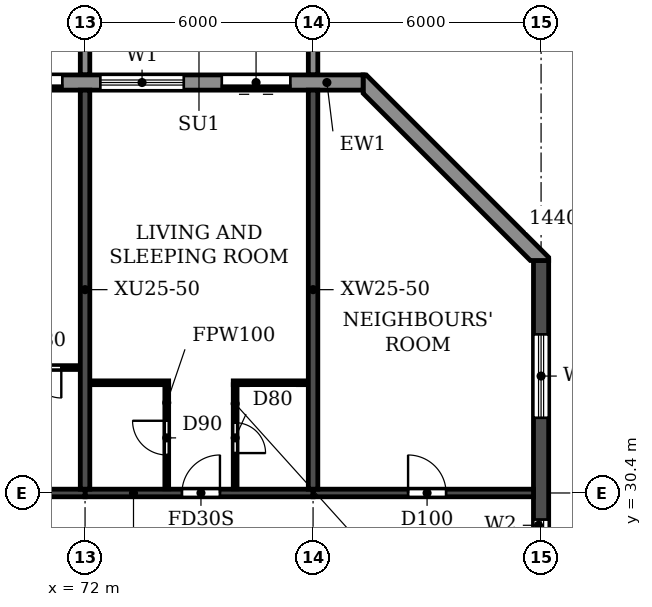
"""IFC4 building model, lengths in metres.
Left out: names, types, materials, properties, quantities, classifications, styles, units other than length and angle.
Written with IfcOpenShell. Run it as: python <this file> out.ifc"""

import sys

from ifc_helpers import new_model, si_unit, direction, frame, frame_2d, origin, place, context, subcontext, project, spatial, polyline, rectangle, outline, extrude, source, transform, mapped, element, fill, save


model = new_model("IFC4")
c1 = context("Model", 3, precision=1e-05, world=origin(), true_north=direction((0.0, 1.0)))
c2 = subcontext(c1, "Body", "Model", "MODEL_VIEW")
j1 = project(units=[si_unit("LENGTHUNIT", "METRE"), si_unit("PLANEANGLEUNIT", "RADIAN")], contexts=[c1])
p1 = place(None, origin())
s1 = spatial("IfcSite", under=j1, at=p1, CompositionType="ELEMENT")
p2 = place(p1, origin())
s2 = spatial("IfcBuilding", under=s1, at=p2, CompositionType="ELEMENT")
p3 = place(p2, frame((0.0, 0.0, 257.7)))
s3 = spatial("IfcBuildingStorey", under=s2, at=p3, CompositionType="ELEMENT", Elevation=257.7)
p4 = place(p3, frame((72.0, 30.5, 0.0), z_axis=(0.0, 0.0, 1.0), x_axis=(0.0, 1.0, 0.0)))
e1 = element("IfcWall", 1, at=p4, inside=s3, PredefinedType="SHEAR", context=c2, shape_type="SweptSolid", body=[
    extrude(rectangle(XDim=10.5, YDim=0.25, at=frame_2d((5.25, 0.0))), origin(), (0.0, 0.0, 1.0), 2.1),
])
p5 = place(p3, frame((78.0, 30.5, 0.0), z_axis=(0.0, 0.0, 1.0), x_axis=(0.0, 1.0, 0.0)))
e2 = element("IfcWall", 2, at=p5, inside=s3, PredefinedType="SHEAR", context=c2, shape_type="SweptSolid", body=[
    extrude(rectangle(XDim=10.5, YDim=0.25, at=frame_2d((5.25, 0.0))), origin(), (0.0, 0.0, 1.0), 3.0),
])
p6 = place(p3, frame((84.0, 4.683, 0.0), z_axis=(0.0, 0.0, 1.0), x_axis=(0.0, 1.0, 0.0)))
e3 = element("IfcWall", 3, at=p6, inside=s3, PredefinedType="SHEAR", context=c2, shape_type="SweptSolid", body=[
    extrude(rectangle(XDim=31.834, YDim=0.4, at=frame_2d((15.917, 0.0))), origin(), (0.0, 0.0, 1.0), 3.0),
])
p7 = place(p6, frame((23.817, 0.0, 0.9)))
e4 = element("IfcOpeningElement", 4, at=p7, cuts=e3, PredefinedType="OPENING", context=c2, shape_type="SweptSolid", body=[
    extrude(rectangle(XDim=1.2, YDim=1.5, at=frame_2d((0.6, 0.75))), frame((0.0, 0.21, 0.0), z_axis=(0.0, -1.0, 0.0), x_axis=(1.0, 0.0, 0.0)), (0.0, 0.0, 1.0), 0.42),
])
p8 = place(p6, frame((8.017, 0.0, 0.9)))
e5 = element("IfcOpeningElement", 5, at=p8, cuts=e3, PredefinedType="OPENING", context=c2, shape_type="SweptSolid", body=[
    extrude(rectangle(XDim=1.2, YDim=1.5, at=frame_2d((0.6, 0.75))), frame((0.0, 0.21, 0.0), z_axis=(0.0, -1.0, 0.0), x_axis=(1.0, 0.0, 0.0)), (0.0, 0.0, 1.0), 0.42),
])
p9 = place(p6, frame((27.694, 0.0, 0.6)))
e6 = element("IfcOpeningElement", 6, at=p9, cuts=e3, PredefinedType="OPENING", context=c2, shape_type="SweptSolid", body=[
    extrude(rectangle(XDim=2.2, YDim=1.8, at=frame_2d((1.1, 0.9))), frame((0.0, 0.21, 0.0), z_axis=(0.0, -1.0, 0.0), x_axis=(1.0, 0.0, 0.0)), (0.0, 0.0, 1.0), 0.42),
])
p10 = place(p6, frame((2.541, 0.0, 0.6)))
e7 = element("IfcOpeningElement", 7, at=p10, cuts=e3, PredefinedType="OPENING", context=c2, shape_type="SweptSolid", body=[
    extrude(rectangle(XDim=2.2, YDim=1.8, at=frame_2d((1.1, 0.9))), frame((0.0, 0.21, 0.0), z_axis=(0.0, -1.0, 0.0), x_axis=(1.0, 0.0, 0.0)), (0.0, 0.0, 1.0), 0.42),
])
p11 = place(p6, frame((15.917, 0.0, 0.9)))
e8 = element("IfcOpeningElement", 8, at=p11, cuts=e3, PredefinedType="OPENING", context=c2, shape_type="SweptSolid", body=[
    extrude(rectangle(XDim=1.2, YDim=1.5, at=frame_2d((0.6, 0.75))), frame((0.0, 0.21, 0.0), z_axis=(0.0, -1.0, 0.0), x_axis=(1.0, 0.0, 0.0)), (0.0, 0.0, 1.0), 0.42),
])
p12 = place(p3, frame((66.0, 30.4, 0.0), z_axis=(0.0, 0.0, 1.0), x_axis=(1.0, 0.0, 0.0)))
e9 = element("IfcWall", 9, at=p12, inside=s3, PredefinedType="SHEAR", context=c2, shape_type="SweptSolid", body=[
    extrude(rectangle(XDim=6.0, YDim=0.2, at=frame_2d((3.0, 0.0))), origin(), (0.0, 0.0, 1.0), 2.4),
])
p13 = place(p12, frame((2.55, 0.0, 0.0)))
e10 = element("IfcOpeningElement", 10, at=p13, cuts=e9, PredefinedType="OPENING", context=c2, shape_type="SweptSolid", body=[
    extrude(rectangle(XDim=1.0, YDim=2.1, at=frame_2d((0.5, 1.05))), frame((0.0, 0.11, 0.0), z_axis=(0.0, -1.0, 0.0), x_axis=(1.0, 0.0, 0.0)), (0.0, 0.0, 1.0), 0.22),
])
p14 = place(p3, frame((72.0, 30.4, 0.0), z_axis=(0.0, 0.0, 1.0), x_axis=(1.0, 0.0, 0.0)))
e11 = element("IfcWall", 11, at=p14, inside=s3, PredefinedType="SHEAR", context=c2, shape_type="SweptSolid", body=[
    extrude(rectangle(XDim=6.0, YDim=0.2, at=frame_2d((3.0, 0.0))), origin(), (0.0, 0.0, 1.0), 2.4),
])
p15 = place(p14, frame((2.55, 0.0, 0.0)))
e12 = element("IfcOpeningElement", 12, at=p15, cuts=e11, PredefinedType="OPENING", context=c2, shape_type="SweptSolid", body=[
    extrude(rectangle(XDim=1.0, YDim=2.1, at=frame_2d((0.5, 1.05))), frame((0.0, 0.11, 0.0), z_axis=(0.0, -1.0, 0.0), x_axis=(1.0, 0.0, 0.0)), (0.0, 0.0, 1.0), 0.22),
])
p16 = place(p3, frame((78.0, 30.4, 0.0), z_axis=(0.0, 0.0, 1.0), x_axis=(1.0, 0.0, 0.0)))
e13 = element("IfcWall", 13, at=p16, inside=s3, PredefinedType="SHEAR", context=c2, shape_type="SweptSolid", body=[
    extrude(rectangle(XDim=5.8, YDim=0.2, at=frame_2d((2.9, 0.0))), origin(), (0.0, 0.0, 1.0), 2.4),
])
p17 = place(p16, frame((2.5, 0.0, 0.0)))
e14 = element("IfcOpeningElement", 14, at=p17, cuts=e13, PredefinedType="OPENING", context=c2, shape_type="SweptSolid", body=[
    extrude(rectangle(XDim=1.0, YDim=2.1, at=frame_2d((0.5, 1.05))), frame((0.0, 0.11, 0.0), z_axis=(0.0, -1.0, 0.0), x_axis=(1.0, 0.0, 0.0)), (0.0, 0.0, 1.0), 0.22),
])
p18 = place(p3, origin())
e15 = element("IfcWall", 15, at=p18, inside=s3, PredefinedType="STANDARD", context=c2, shape_type="SweptSolid", body=[
    extrude(outline(polyline([(84.2, 36.517), (84.2, 36.6), (79.4, 41.4), (79.317, 41.4), (79.317, 40.917), (83.717, 36.517), (84.2, 36.517)])), origin(), (0.0, 0.0, 1.0), 3.0),
])
p19 = place(p3, frame((79.317, 41.2, 0.0), z_axis=(0.0, 0.0, 1.0), x_axis=(-1.0, 0.0, 0.0)))
e16 = element("IfcWall", 16, at=p19, inside=s3, PredefinedType="STANDARD", context=c2, shape_type="SweptSolid", body=[
    extrude(rectangle(XDim=56.634, YDim=0.4, at=frame_2d((28.317, 0.0))), origin(), (0.0, 0.0, 1.0), 3.0),
])
p20 = place(p19, frame((52.717, 0.0, 0.9)))
e17 = element("IfcOpeningElement", 17, at=p20, cuts=e16, PredefinedType="OPENING", context=c2, shape_type="SweptSolid", body=[
    extrude(rectangle(XDim=2.2, YDim=1.5, at=frame_2d((1.1, 0.75))), frame((0.0, 0.21, 0.0), z_axis=(0.0, -1.0, 0.0), x_axis=(1.0, 0.0, 0.0)), (0.0, 0.0, 1.0), 0.42),
])
p21 = place(p19, frame((49.717, 0.0, 0.9)))
e18 = element("IfcOpeningElement", 18, at=p21, cuts=e16, PredefinedType="OPENING", context=c2, shape_type="SweptSolid", body=[
    extrude(rectangle(XDim=2.2, YDim=1.5, at=frame_2d((1.1, 0.75))), frame((0.0, 0.21, 0.0), z_axis=(0.0, -1.0, 0.0), x_axis=(1.0, 0.0, 0.0)), (0.0, 0.0, 1.0), 0.42),
])
p22 = place(p19, frame((46.717, 0.0, 0.9)))
e19 = element("IfcOpeningElement", 19, at=p22, cuts=e16, PredefinedType="OPENING", context=c2, shape_type="SweptSolid", body=[
    extrude(rectangle(XDim=2.2, YDim=1.5, at=frame_2d((1.1, 0.75))), frame((0.0, 0.21, 0.0), z_axis=(0.0, -1.0, 0.0), x_axis=(1.0, 0.0, 0.0)), (0.0, 0.0, 1.0), 0.42),
])
p23 = place(p19, frame((43.917, 0.0, 0.0)))
e20 = element("IfcOpeningElement", 20, at=p23, cuts=e16, PredefinedType="OPENING", context=c2, shape_type="SweptSolid", body=[
    extrude(rectangle(XDim=1.8, YDim=2.4, at=frame_2d((0.9, 1.2))), frame((0.0, 0.21, 0.0), z_axis=(0.0, -1.0, 0.0), x_axis=(1.0, 0.0, 0.0)), (0.0, 0.0, 1.0), 0.42),
])
p24 = place(p19, frame((40.717, 0.0, 0.9)))
e21 = element("IfcOpeningElement", 21, at=p24, cuts=e16, PredefinedType="OPENING", context=c2, shape_type="SweptSolid", body=[
    extrude(rectangle(XDim=2.2, YDim=1.5, at=frame_2d((1.1, 0.75))), frame((0.0, 0.21, 0.0), z_axis=(0.0, -1.0, 0.0), x_axis=(1.0, 0.0, 0.0)), (0.0, 0.0, 1.0), 0.42),
])
p25 = place(p19, frame((37.917, 0.0, 0.0)))
e22 = element("IfcOpeningElement", 22, at=p25, cuts=e16, PredefinedType="OPENING", context=c2, shape_type="SweptSolid", body=[
    extrude(rectangle(XDim=1.8, YDim=2.4, at=frame_2d((0.9, 1.2))), frame((0.0, 0.21, 0.0), z_axis=(0.0, -1.0, 0.0), x_axis=(1.0, 0.0, 0.0)), (0.0, 0.0, 1.0), 0.42),
])
p26 = place(p19, frame((34.717, 0.0, 0.9)))
e23 = element("IfcOpeningElement", 23, at=p26, cuts=e16, PredefinedType="OPENING", context=c2, shape_type="SweptSolid", body=[
    extrude(rectangle(XDim=2.2, YDim=1.5, at=frame_2d((1.1, 0.75))), frame((0.0, 0.21, 0.0), z_axis=(0.0, -1.0, 0.0), x_axis=(1.0, 0.0, 0.0)), (0.0, 0.0, 1.0), 0.42),
])
p27 = place(p19, frame((31.717, 0.0, 0.9)))
e24 = element("IfcOpeningElement", 24, at=p27, cuts=e16, PredefinedType="OPENING", context=c2, shape_type="SweptSolid", body=[
    extrude(rectangle(XDim=2.2, YDim=1.5, at=frame_2d((1.1, 0.75))), frame((0.0, 0.21, 0.0), z_axis=(0.0, -1.0, 0.0), x_axis=(1.0, 0.0, 0.0)), (0.0, 0.0, 1.0), 0.42),
])
p28 = place(p19, frame((28.717, 0.0, 0.9)))
e25 = element("IfcOpeningElement", 25, at=p28, cuts=e16, PredefinedType="OPENING", context=c2, shape_type="SweptSolid", body=[
    extrude(rectangle(XDim=2.2, YDim=1.5, at=frame_2d((1.1, 0.75))), frame((0.0, 0.21, 0.0), z_axis=(0.0, -1.0, 0.0), x_axis=(1.0, 0.0, 0.0)), (0.0, 0.0, 1.0), 0.42),
])
p29 = place(p19, frame((25.917, 0.0, 0.0)))
e26 = element("IfcOpeningElement", 26, at=p29, cuts=e16, PredefinedType="OPENING", context=c2, shape_type="SweptSolid", body=[
    extrude(rectangle(XDim=1.8, YDim=2.4, at=frame_2d((0.9, 1.2))), frame((0.0, 0.21, 0.0), z_axis=(0.0, -1.0, 0.0), x_axis=(1.0, 0.0, 0.0)), (0.0, 0.0, 1.0), 0.42),
])
p30 = place(p19, frame((22.917, 0.0, 0.0)))
e27 = element("IfcOpeningElement", 27, at=p30, cuts=e16, PredefinedType="OPENING", context=c2, shape_type="SweptSolid", body=[
    extrude(rectangle(XDim=1.8, YDim=2.4, at=frame_2d((0.9, 1.2))), frame((0.0, 0.21, 0.0), z_axis=(0.0, -1.0, 0.0), x_axis=(1.0, 0.0, 0.0)), (0.0, 0.0, 1.0), 0.42),
])
p31 = place(p19, frame((19.717, 0.0, 0.9)))
e28 = element("IfcOpeningElement", 28, at=p31, cuts=e16, PredefinedType="OPENING", context=c2, shape_type="SweptSolid", body=[
    extrude(rectangle(XDim=2.2, YDim=1.5, at=frame_2d((1.1, 0.75))), frame((0.0, 0.21, 0.0), z_axis=(0.0, -1.0, 0.0), x_axis=(1.0, 0.0, 0.0)), (0.0, 0.0, 1.0), 0.42),
])
p32 = place(p19, frame((16.717, 0.0, 0.9)))
e29 = element("IfcOpeningElement", 29, at=p32, cuts=e16, PredefinedType="OPENING", context=c2, shape_type="SweptSolid", body=[
    extrude(rectangle(XDim=2.2, YDim=1.5, at=frame_2d((1.1, 0.75))), frame((0.0, 0.21, 0.0), z_axis=(0.0, -1.0, 0.0), x_axis=(1.0, 0.0, 0.0)), (0.0, 0.0, 1.0), 0.42),
])
p33 = place(p19, frame((13.717, 0.0, 0.9)))
e30 = element("IfcOpeningElement", 30, at=p33, cuts=e16, PredefinedType="OPENING", context=c2, shape_type="SweptSolid", body=[
    extrude(rectangle(XDim=2.2, YDim=1.5, at=frame_2d((1.1, 0.75))), frame((0.0, 0.21, 0.0), z_axis=(0.0, -1.0, 0.0), x_axis=(1.0, 0.0, 0.0)), (0.0, 0.0, 1.0), 0.42),
])
p34 = place(p19, frame((10.717, 0.0, 0.9)))
e31 = element("IfcOpeningElement", 31, at=p34, cuts=e16, PredefinedType="OPENING", context=c2, shape_type="SweptSolid", body=[
    extrude(rectangle(XDim=2.2, YDim=1.5, at=frame_2d((1.1, 0.75))), frame((0.0, 0.21, 0.0), z_axis=(0.0, -1.0, 0.0), x_axis=(1.0, 0.0, 0.0)), (0.0, 0.0, 1.0), 0.42),
])
p35 = place(p19, frame((7.917, 0.0, 0.0)))
e32 = element("IfcOpeningElement", 32, at=p35, cuts=e16, PredefinedType="OPENING", context=c2, shape_type="SweptSolid", body=[
    extrude(rectangle(XDim=1.8, YDim=2.4, at=frame_2d((0.9, 1.2))), frame((0.0, 0.21, 0.0), z_axis=(0.0, -1.0, 0.0), x_axis=(1.0, 0.0, 0.0)), (0.0, 0.0, 1.0), 0.42),
])
p36 = place(p19, frame((4.717, 0.0, 0.9)))
e33 = element("IfcOpeningElement", 33, at=p36, cuts=e16, PredefinedType="OPENING", context=c2, shape_type="SweptSolid", body=[
    extrude(rectangle(XDim=2.2, YDim=1.5, at=frame_2d((1.1, 0.75))), frame((0.0, 0.21, 0.0), z_axis=(0.0, -1.0, 0.0), x_axis=(1.0, 0.0, 0.0)), (0.0, 0.0, 1.0), 0.42),
])
p37 = place(p19, frame((1.917, 0.0, 0.0)))
e34 = element("IfcOpeningElement", 34, at=p37, cuts=e16, PredefinedType="OPENING", context=c2, shape_type="SweptSolid", body=[
    extrude(rectangle(XDim=1.8, YDim=2.4, at=frame_2d((0.9, 1.2))), frame((0.0, 0.21, 0.0), z_axis=(0.0, -1.0, 0.0), x_axis=(1.0, 0.0, 0.0)), (0.0, 0.0, 1.0), 0.42),
])
m1 = source(origin(), c2, "Body", "SweptSolid", [
    extrude(outline(polyline([(0.0, 0.0), (0.25, 0.0), (0.25, 3.1), (0.0, 3.1), (0.0, 0.0)])), origin(), (0.0, 0.0, 1.0), 2.1),
])
p38 = place(p3, frame((71.875, 41.4, 0.0)))
e35 = element("IfcWall", 35, at=p38, inside=s3, PredefinedType="STANDARD", context=c2, shape_type="MappedRepresentation", body=[
    mapped(m1, transform((0.0, 0.0, 0.0))),
])
m2 = source(origin(), c2, "Body", "SweptSolid", [
    extrude(outline(polyline([(0.0, 0.0), (0.25, 0.0), (0.25, 3.1), (0.0, 3.1), (0.0, 0.0)])), origin(), (0.0, 0.0, 1.0), 3.1),
])
p39 = place(p3, frame((77.875, 41.4, 0.0)))
e36 = element("IfcWall", 36, at=p39, inside=s3, PredefinedType="STANDARD", context=c2, shape_type="MappedRepresentation", body=[
    mapped(m2, transform((0.0, 0.0, 0.0))),
])
p40 = place(p3, frame((72.135, 33.3, 0.0), z_axis=(0.0, 0.0, 1.0), x_axis=(1.0, 0.0, 0.0)))
e37 = element("IfcWall", 37, at=p40, inside=s3, PredefinedType="PARTITIONING", context=c2, shape_type="SweptSolid", body=[
    extrude(rectangle(XDim=2.065, YDim=0.1, at=frame_2d((1.032, 0.0))), origin(), (0.0, 0.0, 1.0), 3.0),
])
p41 = place(p3, frame((75.9, 33.3, 0.0), z_axis=(0.0, 0.0, 1.0), x_axis=(1.0, 0.0, 0.0)))
e38 = element("IfcWall", 38, at=p41, inside=s3, PredefinedType="PARTITIONING", context=c2, shape_type="SweptSolid", body=[
    extrude(rectangle(XDim=1.965, YDim=0.1, at=frame_2d((0.982, 0.0))), origin(), (0.0, 0.0, 1.0), 3.0),
])
p42 = place(p3, frame((69.9, 33.7, 0.0), z_axis=(0.0, 0.0, 1.0), x_axis=(1.0, 0.0, 0.0)))
e39 = element("IfcWall", 39, at=p42, inside=s3, PredefinedType="PARTITIONING", context=c2, shape_type="SweptSolid", body=[
    extrude(rectangle(XDim=1.965, YDim=0.1, at=frame_2d((0.982, 0.0))), origin(), (0.0, 0.0, 1.0), 3.0),
])
p43 = place(p42, frame((0.675, 0.0, 0.0)))
e40 = element("IfcOpeningElement", 40, at=p43, cuts=e39, PredefinedType="OPENING", context=c2, shape_type="SweptSolid", body=[
    extrude(rectangle(XDim=0.8, YDim=2.1, at=frame_2d((0.4, 1.05))), frame((0.0, 0.06, 0.0), z_axis=(0.0, -1.0, 0.0), x_axis=(1.0, 0.0, 0.0)), (0.0, 0.0, 1.0), 0.12),
])
p44 = place(p3, frame((74.15, 30.51, 0.0), z_axis=(0.0, 0.0, 1.0), x_axis=(0.0, 1.0, 0.0)))
e41 = element("IfcWall", 41, at=p44, inside=s3, PredefinedType="PARTITIONING", context=c2, shape_type="SweptSolid", body=[
    extrude(rectangle(XDim=2.74, YDim=0.1, at=frame_2d((1.37, 0.0))), origin(), (0.0, 0.0, 1.0), 3.0),
])
p45 = place(p44, frame((0.89, 0.0, 0.0)))
e42 = element("IfcOpeningElement", 42, at=p45, cuts=e41, PredefinedType="OPENING", context=c2, shape_type="SweptSolid", body=[
    extrude(rectangle(XDim=0.9, YDim=2.1, at=frame_2d((0.45, 1.05))), frame((0.0, 0.06, 0.0), z_axis=(0.0, -1.0, 0.0), x_axis=(1.0, 0.0, 0.0)), (0.0, 0.0, 1.0), 0.12),
])
p46 = place(p3, frame((75.95, 30.51, 0.0), z_axis=(0.0, 0.0, 1.0), x_axis=(0.0, 1.0, 0.0)))
e43 = element("IfcWall", 43, at=p46, inside=s3, PredefinedType="PARTITIONING", context=c2, shape_type="SweptSolid", body=[
    extrude(rectangle(XDim=2.74, YDim=0.1, at=frame_2d((1.37, 0.0))), origin(), (0.0, 0.0, 1.0), 3.0),
])
p47 = place(p46, frame((0.94, 0.0, 0.0)))
e44 = element("IfcOpeningElement", 44, at=p47, cuts=e43, PredefinedType="OPENING", context=c2, shape_type="SweptSolid", body=[
    extrude(rectangle(XDim=0.8, YDim=2.1, at=frame_2d((0.4, 1.05))), frame((0.0, 0.06, 0.0), z_axis=(0.0, -1.0, 0.0), x_axis=(1.0, 0.0, 0.0)), (0.0, 0.0, 1.0), 0.12),
])
p48 = place(p7, origin())
e45 = element("IfcWindow", 45, at=p48, inside=s3, PartitioningType="SINGLE_PANEL", PredefinedType="WINDOW", context=c2, shape_type="SweptSolid", body=[
    extrude(rectangle(XDim=1.2, YDim=1.5, at=frame_2d((0.6, 0.75))), frame((0.0, 0.03, 0.0), z_axis=(0.0, -1.0, 0.0), x_axis=(1.0, 0.0, 0.0)), (0.0, 0.0, 1.0), 0.06),
])
fill(e4, e45)
p49 = place(p9, origin())
e46 = element("IfcWindow", 46, at=p49, inside=s3, PartitioningType="DOUBLE_PANEL_HORIZONTAL", PredefinedType="WINDOW", context=c2, shape_type="SweptSolid", body=[
    extrude(rectangle(XDim=2.2, YDim=1.8, at=frame_2d((1.1, 0.9))), frame((0.0, 0.03, 0.0), z_axis=(0.0, -1.0, 0.0), x_axis=(1.0, 0.0, 0.0)), (0.0, 0.0, 1.0), 0.06),
])
fill(e6, e46)
p50 = place(p35, origin())
e47 = element("IfcDoor", 47, at=p50, inside=s3, OperationType="DOUBLE_DOOR_SLIDING", PredefinedType="DOOR", context=c2, shape_type="SweptSolid", body=[
    extrude(rectangle(XDim=1.8, YDim=2.4, at=frame_2d((0.9, 1.2))), frame((0.0, 0.025, 0.0), z_axis=(0.0, -1.0, 0.0), x_axis=(1.0, 0.0, 0.0)), (0.0, 0.0, 1.0), 0.05),
])
fill(e32, e47)
p51 = place(p36, origin())
e48 = element("IfcWindow", 48, at=p51, inside=s3, PartitioningType="DOUBLE_PANEL_HORIZONTAL", PredefinedType="WINDOW", context=c2, shape_type="SweptSolid", body=[
    extrude(rectangle(XDim=2.2, YDim=1.5, at=frame_2d((1.1, 0.75))), frame((0.0, 0.03, 0.0), z_axis=(0.0, -1.0, 0.0), x_axis=(1.0, 0.0, 0.0)), (0.0, 0.0, 1.0), 0.06),
])
fill(e33, e48)
p52 = place(p37, origin())
e49 = element("IfcDoor", 49, at=p52, inside=s3, OperationType="DOUBLE_DOOR_SLIDING", PredefinedType="DOOR", context=c2, shape_type="SweptSolid", body=[
    extrude(rectangle(XDim=1.8, YDim=2.4, at=frame_2d((0.9, 1.2))), frame((0.0, 0.025, 0.0), z_axis=(0.0, -1.0, 0.0), x_axis=(1.0, 0.0, 0.0)), (0.0, 0.0, 1.0), 0.05),
])
fill(e34, e49)
p53 = place(p43, frame((0.8, 0.0, 0.0), z_axis=(0.0, 0.0, 1.0), x_axis=(-1.0, 0.0, 0.0)))
e50 = element("IfcDoor", 50, at=p53, inside=s3, OperationType="SINGLE_SWING_LEFT", PredefinedType="DOOR", context=c2, shape_type="SweptSolid", body=[
    extrude(rectangle(XDim=0.8, YDim=2.1, at=frame_2d((0.4, 1.05))), frame((0.0, 0.025, 0.0), z_axis=(0.0, -1.0, 0.0), x_axis=(1.0, 0.0, 0.0)), (0.0, 0.0, 1.0), 0.05),
])
fill(e40, e50)
p54 = place(p45, origin())
e51 = element("IfcDoor", 51, at=p54, inside=s3, OperationType="SINGLE_SWING_RIGHT", PredefinedType="DOOR", context=c2, shape_type="SweptSolid", body=[
    extrude(rectangle(XDim=0.9, YDim=2.1, at=frame_2d((0.45, 1.05))), frame((0.0, 0.025, 0.0), z_axis=(0.0, -1.0, 0.0), x_axis=(1.0, 0.0, 0.0)), (0.0, 0.0, 1.0), 0.05),
])
fill(e42, e51)
p55 = place(p15, origin())
e52 = element("IfcDoor", 52, at=p55, inside=s3, OperationType="SINGLE_SWING_RIGHT", PredefinedType="DOOR", context=c2, shape_type="SweptSolid", body=[
    extrude(rectangle(XDim=1.0, YDim=2.1, at=frame_2d((0.5, 1.05))), frame((0.0, 0.025, 0.0), z_axis=(0.0, -1.0, 0.0), x_axis=(1.0, 0.0, 0.0)), (0.0, 0.0, 1.0), 0.05),
])
fill(e12, e52)
p56 = place(p47, frame((0.8, 0.0, 0.0), z_axis=(0.0, 0.0, 1.0), x_axis=(-1.0, 0.0, 0.0)))
e53 = element("IfcDoor", 53, at=p56, inside=s3, OperationType="SINGLE_SWING_RIGHT", PredefinedType="DOOR", context=c2, shape_type="SweptSolid", body=[
    extrude(rectangle(XDim=0.8, YDim=2.1, at=frame_2d((0.4, 1.05))), frame((0.0, 0.025, 0.0), z_axis=(0.0, -1.0, 0.0), x_axis=(1.0, 0.0, 0.0)), (0.0, 0.0, 1.0), 0.05),
])
fill(e44, e53)
p57 = place(p17, origin())
e54 = element("IfcDoor", 54, at=p57, inside=s3, OperationType="SINGLE_SWING_LEFT", PredefinedType="DOOR", context=c2, shape_type="SweptSolid", body=[
    extrude(rectangle(XDim=1.0, YDim=2.1, at=frame_2d((0.5, 1.05))), frame((0.0, 0.025, 0.0), z_axis=(0.0, -1.0, 0.0), x_axis=(1.0, 0.0, 0.0)), (0.0, 0.0, 1.0), 0.05),
])
fill(e14, e54)
save(model, sys.argv[1])
